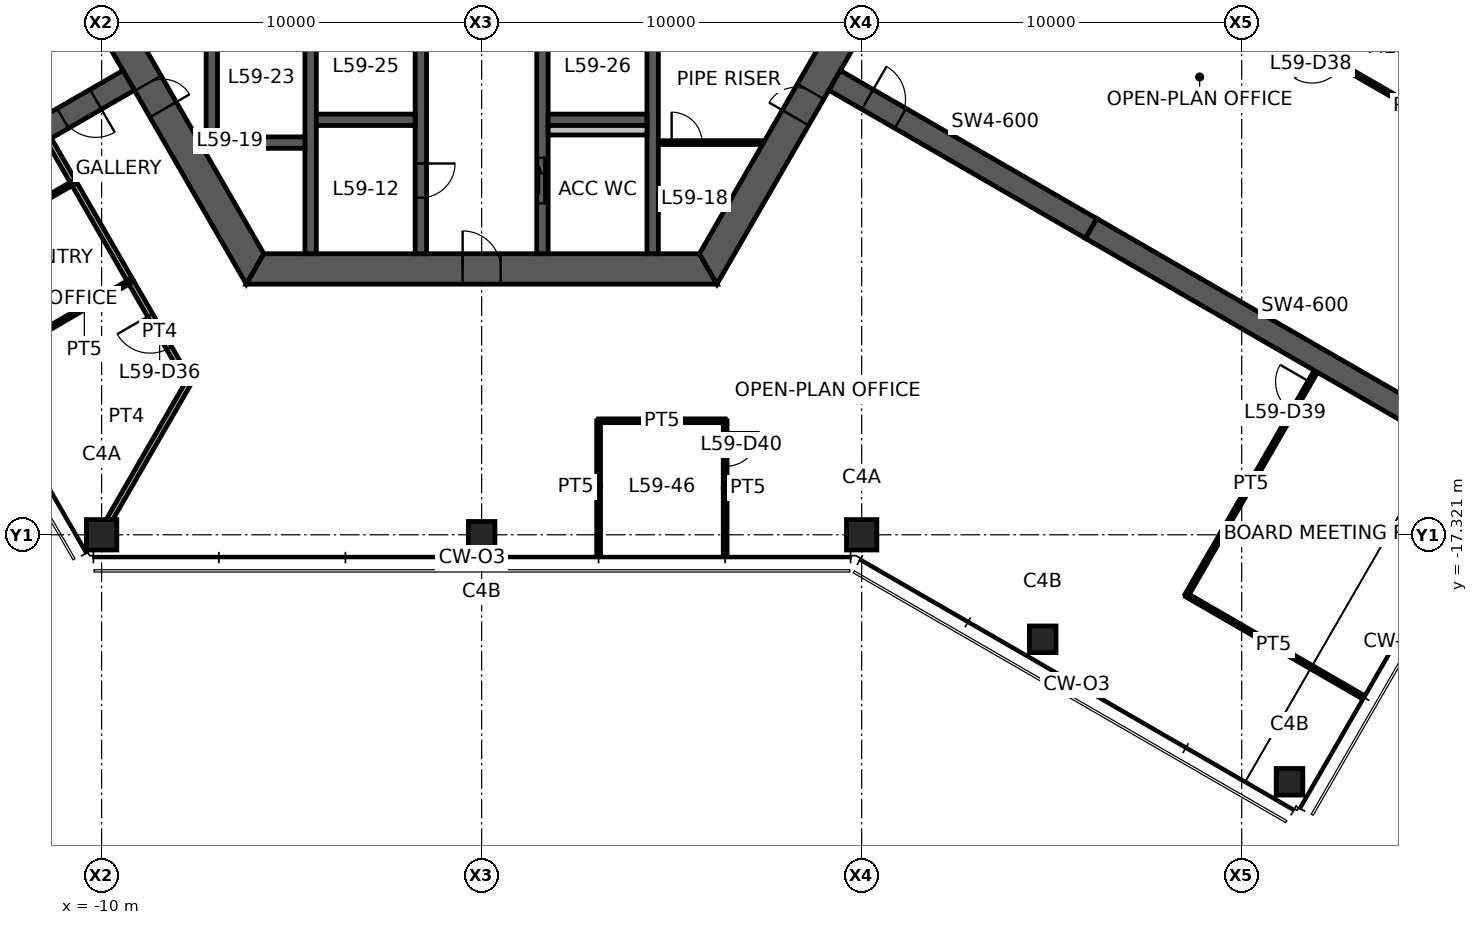
"""IFC4 building model, lengths in metres.
Left out: names, types, materials, properties, quantities, classifications, styles, units other than length and angle.
Written with IfcOpenShell. Run it as: python <this file> out.ifc"""

import sys

from ifc_helpers import new_model, si_unit, direction, frame, frame_2d, origin, origin_2d, place, context, subcontext, project, spatial, polyline, rectangle, hollow_rectangle, outline, extrude, element, fill, save


model = new_model("IFC4")
c1 = context("Model", 3, precision=1e-05, world=origin(), true_north=direction((0.0, 1.0)))
c2 = subcontext(c1, "Body", "Model", "MODEL_VIEW")
j1 = project(units=[si_unit("LENGTHUNIT", "METRE"), si_unit("PLANEANGLEUNIT", "RADIAN")], contexts=[c1])
p1 = place(None, origin())
s1 = spatial("IfcSite", under=j1, at=p1, CompositionType="ELEMENT")
p2 = place(p1, origin())
s2 = spatial("IfcBuilding", under=s1, at=p2, CompositionType="ELEMENT")
p3 = place(p2, frame((0.0, 0.0, 236.2)))
s3 = spatial("IfcBuildingStorey", under=s2, at=p3, CompositionType="ELEMENT", Elevation=236.2)
for number, where, z_axis, x_axis in (
    (1, (-10.0, -17.321, 0.0), (0.0, 0.0, 1.0), (1.0, 0.0, 0.0)),
    (2, (10.0, -17.321, 0.0), (0.0, 0.0, 1.0), (1.0, 0.0, 0.0)),
):
    element("IfcColumn", number, at=place(p3, frame(where, z_axis=z_axis, x_axis=x_axis)), inside=s3, PredefinedType="COLUMN", context=c2, shape_type="SweptSolid", body=[
        extrude(hollow_rectangle(XDim=0.8, YDim=0.8, WallThickness=0.04, at=origin_2d()), origin(), (0.0, 0.0, 1.0), 3.9),
    ])
for number, where, z_axis, x_axis in (
    (3, (0.0, -17.321, 0.0), (0.0, 0.0, 1.0), (1.0, 0.0, 0.0)),
    (4, (14.763, -20.071, 0.0), (0.0, 0.0, 1.0), (1.0, 0.0, 0.0)),
    (5, (21.258, -23.821, 0.0), (0.0, 0.0, 1.0), (1.0, 0.0, 0.0)),
):
    element("IfcColumn", number, at=place(p3, frame(where, z_axis=z_axis, x_axis=x_axis)), inside=s3, PredefinedType="COLUMN", context=c2, shape_type="SweptSolid", body=[
        extrude(hollow_rectangle(XDim=0.7, YDim=0.7, WallThickness=0.032, at=origin_2d()), origin(), (0.0, 0.0, 1.0), 3.9),
    ])
p4 = place(p3, frame((-11.922, 0.0, 0.0), z_axis=(0.0, 0.0, 1.0), x_axis=(0.500004296715, -0.866022923061, 0.0)))
e6 = element("IfcWall", 6, at=p4, inside=s3, PredefinedType="SHEAR", context=c2, shape_type="SweptSolid", body=[
    extrude(outline(polyline([(-0.231, -0.4), (6.281, -0.4), (7.081, -0.4), (12.153, -0.4), (11.691, 0.4), (7.081, 0.4), (6.281, 0.4), (0.231, 0.4), (-0.231, -0.4)])), origin(), (0.0, 0.0, 1.0), 3.9),
])
p5 = place(p4, frame((6.281, 0.0, 0.0)))
e7 = element("IfcOpeningElement", 7, at=p5, cuts=e6, PredefinedType="OPENING", context=c2, shape_type="SweptSolid", body=[
    extrude(rectangle(XDim=0.8, YDim=2.1, at=frame_2d((0.4, 1.05))), frame((0.0, 0.41, 0.0), z_axis=(0.0, -1.0, 0.0), x_axis=(1.0, 0.0, 0.0)), (0.0, 0.0, 1.0), 0.82),
])
p6 = place(p3, frame((-5.961, -10.325, 0.0), z_axis=(0.0, 0.0, 1.0), x_axis=(1.0, 0.0, 0.0)))
e8 = element("IfcWall", 8, at=p6, inside=s3, PredefinedType="SHEAR", context=c2, shape_type="SweptSolid", body=[
    extrude(outline(polyline([(-0.231, -0.4), (5.461, -0.4), (6.461, -0.4), (12.153, -0.4), (11.691, 0.4), (6.461, 0.4), (5.461, 0.4), (0.231, 0.4), (-0.231, -0.4)])), origin(), (0.0, 0.0, 1.0), 3.9),
])
p7 = place(p6, frame((5.461, 0.0, 0.0)))
e9 = element("IfcOpeningElement", 9, at=p7, cuts=e8, PredefinedType="OPENING", context=c2, shape_type="SweptSolid", body=[
    extrude(rectangle(XDim=1.0, YDim=2.1, at=frame_2d((0.5, 1.05))), frame((0.0, 0.41, 0.0), z_axis=(0.0, -1.0, 0.0), x_axis=(1.0, 0.0, 0.0)), (0.0, 0.0, 1.0), 0.82),
])
p8 = place(p3, frame((5.961, -10.325, 0.0), z_axis=(0.0, 0.0, 1.0), x_axis=(0.500004296715, 0.866022923061, 0.0)))
e10 = element("IfcWall", 10, at=p8, inside=s3, PredefinedType="SHEAR", context=c2, shape_type="SweptSolid", body=[
    extrude(outline(polyline([(-0.231, -0.4), (4.594, -0.4), (5.394, -0.4), (12.153, -0.4), (11.691, 0.4), (5.394, 0.4), (4.594, 0.4), (0.231, 0.4), (-0.231, -0.4)])), origin(), (0.0, 0.0, 1.0), 3.9),
])
p9 = place(p8, frame((4.594, 0.0, 0.0)))
e11 = element("IfcOpeningElement", 11, at=p9, cuts=e10, PredefinedType="OPENING", context=c2, shape_type="SweptSolid", body=[
    extrude(rectangle(XDim=0.8, YDim=2.1, at=frame_2d((0.4, 1.05))), frame((0.0, 0.41, 0.0), z_axis=(0.0, -1.0, 0.0), x_axis=(1.0, 0.0, 0.0)), (0.0, 0.0, 1.0), 0.82),
])
p10 = place(p3, frame((-9.288, -5.363, 0.0), z_axis=(0.0, 0.0, 1.0), x_axis=(-0.866027473358, -0.499996415376, 0.0)))
e12 = element("IfcWall", 12, at=p10, inside=s3, PredefinedType="SHEAR", context=c2, shape_type="SweptSolid", body=[
    extrude(rectangle(XDim=7.045, YDim=0.6, at=frame_2d((3.523, 0.0))), origin(), (0.0, 0.0, 1.0), 3.9),
])
p11 = place(p10, frame((1.0, 0.0, 0.0)))
e13 = element("IfcOpeningElement", 13, at=p11, cuts=e12, PredefinedType="OPENING", context=c2, shape_type="SweptSolid", body=[
    extrude(rectangle(XDim=1.0, YDim=2.1, at=frame_2d((0.5, 1.05))), frame((0.0, 0.31, 0.0), z_axis=(0.0, -1.0, 0.0), x_axis=(1.0, 0.0, 0.0)), (0.0, 0.0, 1.0), 0.62),
])
p12 = place(p3, frame((9.288, -5.363, 0.0), z_axis=(0.0, 0.0, 1.0), x_axis=(0.866031736626, -0.499989031036, 0.0)))
e14 = element("IfcWall", 14, at=p12, inside=s3, PredefinedType="SHEAR", context=c2, shape_type="SweptSolid", body=[
    extrude(rectangle(XDim=7.796, YDim=0.6, at=frame_2d((3.898, 0.0))), origin(), (0.0, 0.0, 1.0), 3.9),
])
p13 = place(p12, frame((1.0, 0.0, 0.0)))
e15 = element("IfcOpeningElement", 15, at=p13, cuts=e14, PredefinedType="OPENING", context=c2, shape_type="SweptSolid", body=[
    extrude(rectangle(XDim=1.0, YDim=2.1, at=frame_2d((0.5, 1.05))), frame((0.0, 0.31, 0.0), z_axis=(0.0, -1.0, 0.0), x_axis=(1.0, 0.0, 0.0)), (0.0, 0.0, 1.0), 0.62),
])
p14 = place(p3, frame((16.039, -9.26, 0.0), z_axis=(0.0, 0.0, 1.0), x_axis=(0.866024837091, -0.50000098154, 0.0)))
e16 = element("IfcWall", 16, at=p14, inside=s3, PredefinedType="SHEAR", context=c2, shape_type="SweptSolid", body=[
    extrude(rectangle(XDim=13.0, YDim=0.6, at=frame_2d((6.5, 0.0))), origin(), (0.0, 0.0, 1.0), 3.9),
])
p15 = place(p3, frame((-1.6, -3.75, 0.0), z_axis=(0.0, 0.0, 1.0), x_axis=(0.0, -1.0, 0.0)))
e17 = element("IfcWall", 17, at=p15, inside=s3, PredefinedType="SHEAR", context=c2, shape_type="SweptSolid", body=[
    extrude(rectangle(XDim=6.175, YDim=0.3, at=frame_2d((3.087, 0.0))), origin(), (0.0, 0.0, 1.0), 3.9),
])
p16 = place(p15, frame((3.8, 0.0, 0.0)))
e18 = element("IfcOpeningElement", 18, at=p16, cuts=e17, PredefinedType="OPENING", context=c2, shape_type="SweptSolid", body=[
    extrude(rectangle(XDim=0.9, YDim=2.1, at=frame_2d((0.45, 1.05))), frame((0.0, 0.16, 0.0), z_axis=(0.0, -1.0, 0.0), x_axis=(1.0, 0.0, 0.0)), (0.0, 0.0, 1.0), 0.32),
])
p17 = place(p3, frame((1.6, -3.75, 0.0), z_axis=(0.0, 0.0, 1.0), x_axis=(0.0, -1.0, 0.0)))
e19 = element("IfcWall", 19, at=p17, inside=s3, PredefinedType="SHEAR", context=c2, shape_type="SweptSolid", body=[
    extrude(rectangle(XDim=6.175, YDim=0.3, at=frame_2d((3.087, 0.0))), origin(), (0.0, 0.0, 1.0), 3.9),
])
p18 = place(p17, frame((3.65, 0.0, 0.0)))
e20 = element("IfcOpeningElement", 20, at=p18, cuts=e19, PredefinedType="OPENING", context=c2, shape_type="SweptSolid", body=[
    extrude(rectangle(XDim=1.2, YDim=2.1, at=frame_2d((0.6, 1.05))), frame((0.0, 0.16, 0.0), z_axis=(0.0, -1.0, 0.0), x_axis=(1.0, 0.0, 0.0)), (0.0, 0.0, 1.0), 0.32),
])
for number, where, z_axis, x_axis in (
    (21, (-4.5, -3.75, 0.0), (0.0, 0.0, 1.0), (0.0, -1.0, 0.0)),
    (22, (4.5, -3.75, 0.0), (0.0, 0.0, 1.0), (0.0, -1.0, 0.0)),
):
    element("IfcWall", number, at=place(p3, frame(where, z_axis=z_axis, x_axis=x_axis)), inside=s3, PredefinedType="SHEAR", context=c2, shape_type="SweptSolid", body=[
        extrude(rectangle(XDim=6.175, YDim=0.3, at=frame_2d((3.087, 0.0))), origin(), (0.0, 0.0, 1.0), 3.9),
    ])
for number, where, z_axis, x_axis in (
    (23, (-4.35, -6.4, 0.0), (0.0, 0.0, 1.0), (1.0, 0.0, 0.0)),
    (24, (1.75, -6.4, 0.0), (0.0, 0.0, 1.0), (1.0, 0.0, 0.0)),
    (25, (-7.25, -7.0, 0.0), (0.0, 0.0, 1.0), (1.0, 0.0, 0.0)),
):
    element("IfcWall", number, at=place(p3, frame(where, z_axis=z_axis, x_axis=x_axis)), inside=s3, PredefinedType="SHEAR", context=c2, shape_type="SweptSolid", body=[
        extrude(rectangle(XDim=2.6, YDim=0.3, at=frame_2d((1.3, 0.0))), origin(), (0.0, 0.0, 1.0), 3.9),
    ])
p19 = place(p3, frame((-7.1, -3.75, 0.0), z_axis=(0.0, 0.0, 1.0), x_axis=(0.0, -1.0, 0.0)))
e26 = element("IfcWall", 26, at=p19, inside=s3, PredefinedType="SHEAR", context=c2, shape_type="SweptSolid", body=[
    extrude(rectangle(XDim=3.1, YDim=0.3, at=frame_2d((1.55, 0.0))), origin(), (0.0, 0.0, 1.0), 3.9),
])
p20 = place(p3, frame((1.75, -6.675, 0.0), z_axis=(0.0, 0.0, 1.0), x_axis=(1.0, 0.0, 0.0)))
e27 = element("IfcWall", 27, at=p20, inside=s3, PredefinedType="PLUMBINGWALL", context=c2, shape_type="SweptSolid", body=[
    extrude(rectangle(XDim=2.6, YDim=0.25, at=frame_2d((1.3, 0.0))), origin(), (0.0, 0.0, 1.0), 3.9),
])
p21 = place(p3, frame((4.65, -7.0, 0.0), z_axis=(0.0, 0.0, 1.0), x_axis=(1.0, 0.0, 0.0)))
e28 = element("IfcWall", 28, at=p21, inside=s3, PredefinedType="PARTITIONING", context=c2, shape_type="SweptSolid", body=[
    extrude(outline(polyline([(0.0, -0.05), (0.35, -0.05), (1.15, -0.05), (2.74, -0.05), (2.769, 0.0), (2.775, 0.05), (1.15, 0.05), (0.35, 0.05), (0.0, 0.05), (0.0, -0.05)])), origin(), (0.0, 0.0, 1.0), 2.95),
])
p22 = place(p21, frame((0.35, 0.0, 0.0)))
e29 = element("IfcOpeningElement", 29, at=p22, cuts=e28, PredefinedType="OPENING", context=c2, shape_type="SweptSolid", body=[
    extrude(rectangle(XDim=0.8, YDim=2.1, at=frame_2d((0.4, 1.05))), frame((0.0, 0.06, 0.0), z_axis=(0.0, -1.0, 0.0), x_axis=(1.0, 0.0, 0.0)), (0.0, 0.0, 1.0), 0.12),
])
p23 = place(p3, frame((-9.237, -10.65, 0.0), z_axis=(0.0, 0.0, 1.0), x_axis=(-0.499977562641, 0.866038357612, 0.0)))
e30 = element("IfcWall", 30, at=p23, inside=s3, PredefinedType="PARTITIONING", context=c2, shape_type="SweptSolid", body=[
    extrude(rectangle(XDim=3.01, YDim=0.15, at=frame_2d((1.505, 0.0))), origin(), (0.0, 0.0, 1.0), 2.95),
])
p24 = place(p3, frame((-10.738, -8.052, 0.0), z_axis=(0.0, 0.0, 1.0), x_axis=(-0.500084415177, 0.865976661173, 0.0)))
e31 = element("IfcWall", 31, at=p24, inside=s3, PredefinedType="PARTITIONING", context=c2, shape_type="SweptSolid", body=[
    extrude(rectangle(XDim=1.284, YDim=0.15, at=frame_2d((0.642, 0.0))), origin(), (0.0, 0.0, 1.0), 2.95),
])
p25 = place(p3, frame((-7.705, -13.305, 0.0), z_axis=(0.0, 0.0, 1.0), x_axis=(-0.500024891708, 0.866011032073, 0.0)))
e32 = element("IfcWall", 32, at=p25, inside=s3, PredefinedType="PARTITIONING", context=c2, shape_type="SweptSolid", body=[
    extrude(rectangle(XDim=3.074, YDim=0.15, at=frame_2d((1.537, 0.0))), origin(), (0.0, 0.0, 1.0), 2.95),
])
p26 = place(p25, frame((1.037, 0.0, 0.0)))
e33 = element("IfcOpeningElement", 33, at=p26, cuts=e32, PredefinedType="OPENING", context=c2, shape_type="SweptSolid", body=[
    extrude(rectangle(XDim=1.0, YDim=2.1, at=frame_2d((0.5, 1.05))), frame((0.0, 0.085, 0.0), z_axis=(0.0, -1.0, 0.0), x_axis=(1.0, 0.0, 0.0)), (0.0, 0.0, 1.0), 0.17),
])
for number, where, z_axis, x_axis in (
    (34, (-13.165, -9.448, 0.0), (0.0, 0.0, 1.0), (0.867, 0.499, 0.0)),
    (35, (-9.242, -10.642, 0.0), (0.0, 0.0, 1.0), (-0.865, -0.501, 0.0)),
):
    element("IfcWall", number, at=place(p3, frame(where, z_axis=z_axis, x_axis=x_axis)), inside=s3, PredefinedType="PARTITIONING", context=c2, shape_type="SweptSolid", body=[
        extrude(rectangle(XDim=2.8, YDim=0.1, at=frame_2d((1.4, 0.0))), origin(), (0.0, 0.0, 1.0), 2.95),
    ])
p27 = place(p3, frame((27.325, -7.693, 0.0), z_axis=(0.0, 0.0, 1.0), x_axis=(-0.866021597574, 0.500006592492, 0.0)))
e36 = element("IfcWall", 36, at=p27, inside=s3, PredefinedType="PARTITIONING", context=c2, shape_type="SweptSolid", body=[
    extrude(rectangle(XDim=6.62, YDim=0.1, at=frame_2d((3.31, 0.0))), origin(), (0.0, 0.0, 1.0), 2.95),
])
p28 = place(p27, frame((5.42, 0.0, 0.0)))
e37 = element("IfcOpeningElement", 37, at=p28, cuts=e36, PredefinedType="OPENING", context=c2, shape_type="SweptSolid", body=[
    extrude(rectangle(XDim=0.9, YDim=2.1, at=frame_2d((0.45, 1.05))), frame((0.0, 0.06, 0.0), z_axis=(0.0, -1.0, 0.0), x_axis=(1.0, 0.0, 0.0)), (0.0, 0.0, 1.0), 0.12),
])
p29 = place(p3, frame((18.552, -18.909, 0.0), z_axis=(0.0, 0.0, 1.0), x_axis=(0.499992600721, 0.866029675718, 0.0)))
e38 = element("IfcWall", 38, at=p29, inside=s3, PredefinedType="PARTITIONING", context=c2, shape_type="SweptSolid", body=[
    extrude(rectangle(XDim=6.78, YDim=0.1, at=frame_2d((3.39, 0.0))), origin(), (0.0, 0.0, 1.0), 2.95),
])
p30 = place(p29, frame((5.58, 0.0, 0.0)))
e39 = element("IfcOpeningElement", 39, at=p30, cuts=e38, PredefinedType="OPENING", context=c2, shape_type="SweptSolid", body=[
    extrude(rectangle(XDim=0.9, YDim=2.1, at=frame_2d((0.45, 1.05))), frame((0.0, 0.06, 0.0), z_axis=(0.0, -1.0, 0.0), x_axis=(1.0, 0.0, 0.0)), (0.0, 0.0, 1.0), 0.12),
])
p31 = place(p3, frame((23.124, -21.549, 0.0), z_axis=(0.0, 0.0, 1.0), x_axis=(-0.866009249374, 0.500027979216, 0.0)))
e40 = element("IfcWall", 40, at=p31, inside=s3, PredefinedType="PARTITIONING", context=c2, shape_type="SweptSolid", body=[
    extrude(rectangle(XDim=5.28, YDim=0.1, at=frame_2d((2.64, 0.0))), origin(), (0.0, 0.0, 1.0), 2.95),
])
p32 = place(p3, frame((3.077, -17.801, 0.0), z_axis=(0.0, 0.0, 1.0), x_axis=(0.0, 1.0, 0.0)))
e41 = element("IfcWall", 41, at=p32, inside=s3, PredefinedType="PARTITIONING", context=c2, shape_type="SweptSolid", body=[
    extrude(rectangle(XDim=3.48, YDim=0.1, at=frame_2d((1.74, 0.0))), origin(), (0.0, 0.0, 1.0), 2.95),
])
p33 = place(p3, frame((3.077, -14.321, 0.0), z_axis=(0.0, 0.0, 1.0), x_axis=(1.0, 0.0, 0.0)))
e42 = element("IfcWall", 42, at=p33, inside=s3, PredefinedType="PARTITIONING", context=c2, shape_type="SweptSolid", body=[
    extrude(rectangle(XDim=3.331, YDim=0.1, at=frame_2d((1.666, 0.0))), origin(), (0.0, 0.0, 1.0), 2.95),
])
p34 = place(p3, frame((6.408, -14.321, 0.0), z_axis=(0.0, 0.0, 1.0), x_axis=(0.0, -1.0, 0.0)))
e43 = element("IfcWall", 43, at=p34, inside=s3, PredefinedType="PARTITIONING", context=c2, shape_type="SweptSolid", body=[
    extrude(rectangle(XDim=3.535, YDim=0.1, at=frame_2d((1.768, 0.0))), origin(), (0.0, 0.0, 1.0), 2.95),
])
p35 = place(p34, frame((0.3, 0.0, 0.0)))
e44 = element("IfcOpeningElement", 44, at=p35, cuts=e43, PredefinedType="OPENING", context=c2, shape_type="SweptSolid", body=[
    extrude(rectangle(XDim=0.9, YDim=2.1, at=frame_2d((0.45, 1.05))), frame((0.0, 0.06, 0.0), z_axis=(0.0, -1.0, 0.0), x_axis=(1.0, 0.0, 0.0)), (0.0, 0.0, 1.0), 0.12),
])
p36 = place(p3, frame((-7.705, -13.305, 0.0), z_axis=(0.0, 0.0, 1.0), x_axis=(-0.500036655653, -0.866004239599, 0.0)))
e45 = element("IfcWall", 45, at=p36, inside=s3, PredefinedType="PARTITIONING", context=c2, shape_type="SweptSolid", body=[
    extrude(rectangle(XDim=4.17, YDim=0.15, at=frame_2d((2.085, 0.0))), origin(), (0.0, 0.0, 1.0), 2.95),
])
p37 = place(p7, origin())
e46 = element("IfcDoor", 46, at=p37, inside=s3, OperationType="SINGLE_SWING_LEFT", PredefinedType="DOOR", context=c2, shape_type="SweptSolid", body=[
    extrude(rectangle(XDim=1.0, YDim=2.1, at=frame_2d((0.5, 1.05))), frame((0.0, 0.025, 0.0), z_axis=(0.0, -1.0, 0.0), x_axis=(1.0, 0.0, 0.0)), (0.0, 0.0, 1.0), 0.05),
])
fill(e9, e46)
p38 = place(p9, origin())
e47 = element("IfcDoor", 47, at=p38, inside=s3, OperationType="SINGLE_SWING_LEFT", PredefinedType="DOOR", context=c2, shape_type="SweptSolid", body=[
    extrude(rectangle(XDim=0.8, YDim=2.1, at=frame_2d((0.4, 1.05))), frame((0.0, 0.025, 0.0), z_axis=(0.0, -1.0, 0.0), x_axis=(1.0, 0.0, 0.0)), (0.0, 0.0, 1.0), 0.05),
])
fill(e11, e47)
p39 = place(p5, origin())
e48 = element("IfcDoor", 48, at=p39, inside=s3, OperationType="SINGLE_SWING_RIGHT", PredefinedType="DOOR", context=c2, shape_type="SweptSolid", body=[
    extrude(rectangle(XDim=0.8, YDim=2.1, at=frame_2d((0.4, 1.05))), frame((0.0, 0.025, 0.0), z_axis=(0.0, -1.0, 0.0), x_axis=(1.0, 0.0, 0.0)), (0.0, 0.0, 1.0), 0.05),
])
fill(e7, e48)
p40 = place(p18, origin())
e49 = element("IfcDoor", 49, at=p40, inside=s3, OperationType="SLIDING_TO_LEFT", PredefinedType="DOOR", context=c2, shape_type="SweptSolid", body=[
    extrude(rectangle(XDim=1.2, YDim=2.1, at=frame_2d((0.6, 1.05))), frame((0.0, 0.025, 0.0), z_axis=(0.0, -1.0, 0.0), x_axis=(1.0, 0.0, 0.0)), (0.0, 0.0, 1.0), 0.05),
])
fill(e20, e49)
p41 = place(p16, origin())
e50 = element("IfcDoor", 50, at=p41, inside=s3, OperationType="SINGLE_SWING_LEFT", PredefinedType="DOOR", context=c2, shape_type="SweptSolid", body=[
    extrude(rectangle(XDim=0.9, YDim=2.1, at=frame_2d((0.45, 1.05))), frame((0.0, 0.025, 0.0), z_axis=(0.0, -1.0, 0.0), x_axis=(1.0, 0.0, 0.0)), (0.0, 0.0, 1.0), 0.05),
])
fill(e18, e50)
p42 = place(p11, origin())
e51 = element("IfcDoor", 51, at=p42, inside=s3, OperationType="SINGLE_SWING_LEFT", PredefinedType="DOOR", context=c2, shape_type="SweptSolid", body=[
    extrude(rectangle(XDim=1.0, YDim=2.1, at=frame_2d((0.5, 1.05))), frame((0.0, 0.025, 0.0), z_axis=(0.0, -1.0, 0.0), x_axis=(1.0, 0.0, 0.0)), (0.0, 0.0, 1.0), 0.05),
])
fill(e13, e51)
p43 = place(p13, origin())
e52 = element("IfcDoor", 52, at=p43, inside=s3, OperationType="SINGLE_SWING_LEFT", PredefinedType="DOOR", context=c2, shape_type="SweptSolid", body=[
    extrude(rectangle(XDim=1.0, YDim=2.1, at=frame_2d((0.5, 1.05))), frame((0.0, 0.025, 0.0), z_axis=(0.0, -1.0, 0.0), x_axis=(1.0, 0.0, 0.0)), (0.0, 0.0, 1.0), 0.05),
])
fill(e15, e52)
p44 = place(p22, origin())
e53 = element("IfcDoor", 53, at=p44, inside=s3, OperationType="SINGLE_SWING_LEFT", PredefinedType="DOOR", context=c2, shape_type="SweptSolid", body=[
    extrude(rectangle(XDim=0.8, YDim=2.1, at=frame_2d((0.4, 1.05))), frame((0.0, 0.025, 0.0), z_axis=(0.0, -1.0, 0.0), x_axis=(1.0, 0.0, 0.0)), (0.0, 0.0, 1.0), 0.05),
])
fill(e29, e53)
p45 = place(p26, origin())
e54 = element("IfcDoor", 54, at=p45, inside=s3, OperationType="SINGLE_SWING_RIGHT", PredefinedType="DOOR", context=c2, shape_type="SweptSolid", body=[
    extrude(rectangle(XDim=1.0, YDim=2.1, at=frame_2d((0.5, 1.05))), frame((0.0, 0.025, 0.0), z_axis=(0.0, -1.0, 0.0), x_axis=(1.0, 0.0, 0.0)), (0.0, 0.0, 1.0), 0.05),
])
fill(e33, e54)
p46 = place(p28, origin())
e55 = element("IfcDoor", 55, at=p46, inside=s3, OperationType="SINGLE_SWING_RIGHT", PredefinedType="DOOR", context=c2, shape_type="SweptSolid", body=[
    extrude(rectangle(XDim=0.9, YDim=2.1, at=frame_2d((0.45, 1.05))), frame((0.0, 0.025, 0.0), z_axis=(0.0, -1.0, 0.0), x_axis=(1.0, 0.0, 0.0)), (0.0, 0.0, 1.0), 0.05),
])
fill(e37, e55)
p47 = place(p30, origin())
e56 = element("IfcDoor", 56, at=p47, inside=s3, OperationType="SINGLE_SWING_RIGHT", PredefinedType="DOOR", context=c2, shape_type="SweptSolid", body=[
    extrude(rectangle(XDim=0.9, YDim=2.1, at=frame_2d((0.45, 1.05))), frame((0.0, 0.025, 0.0), z_axis=(0.0, -1.0, 0.0), x_axis=(1.0, 0.0, 0.0)), (0.0, 0.0, 1.0), 0.05),
])
fill(e39, e56)
p48 = place(p35, origin())
e57 = element("IfcDoor", 57, at=p48, inside=s3, OperationType="SINGLE_SWING_LEFT", PredefinedType="DOOR", context=c2, shape_type="SweptSolid", body=[
    extrude(rectangle(XDim=0.9, YDim=2.1, at=frame_2d((0.45, 1.05))), frame((0.0, 0.025, 0.0), z_axis=(0.0, -1.0, 0.0), x_axis=(1.0, 0.0, 0.0)), (0.0, 0.0, 1.0), 0.05),
])
fill(e44, e57)
save(model, sys.argv[1])
